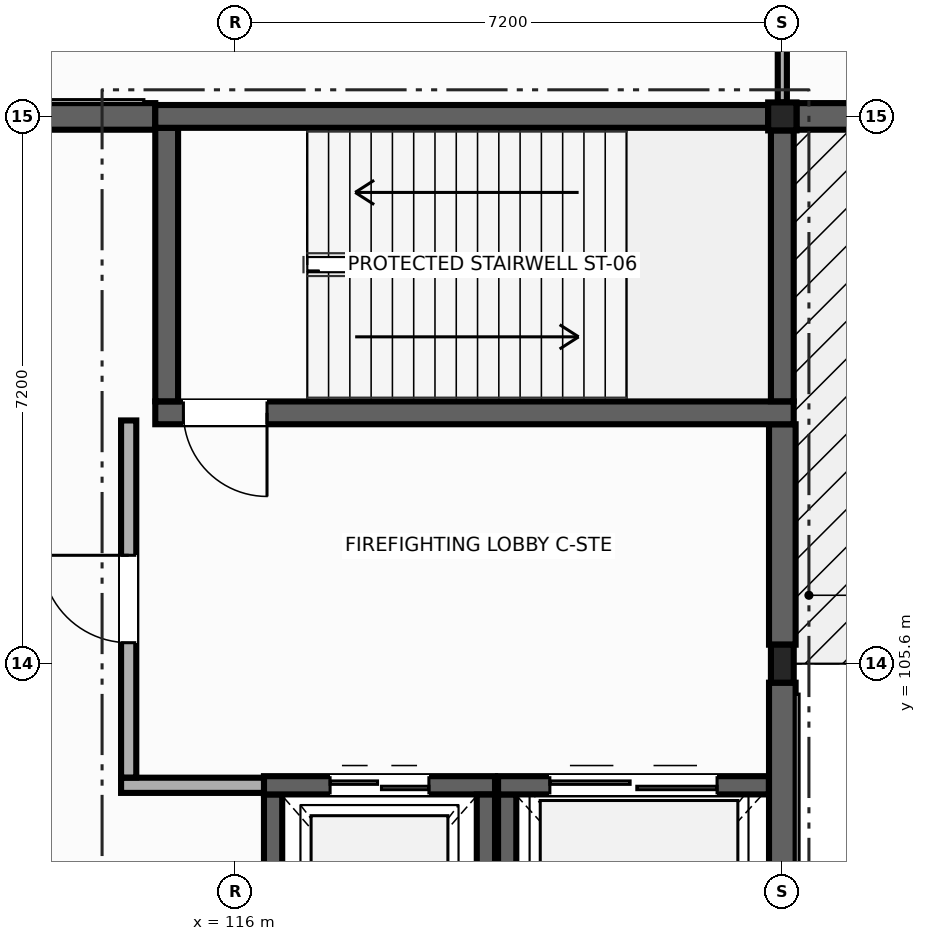
"""IFC4 building model, lengths in metres.
Left out: names, types, materials, properties, quantities, classifications, styles, units other than length and angle.
Written with IfcOpenShell. Run it as: python <this file> out.ifc"""

import sys

from ifc_helpers import new_model, si_unit, direction, frame, frame_2d, origin, origin_2d, place, context, subcontext, project, spatial, rectangle, i_section, extrude, element, fill, save


model = new_model("IFC4")
c1 = context("Model", 3, precision=1e-05, world=origin(), true_north=direction((0.0, 1.0)))
c2 = subcontext(c1, "Body", "Model", "MODEL_VIEW")
j1 = project(units=[si_unit("LENGTHUNIT", "METRE"), si_unit("PLANEANGLEUNIT", "RADIAN")], contexts=[c1])
p1 = place(None, origin())
s1 = spatial("IfcSite", under=j1, at=p1, CompositionType="ELEMENT")
p2 = place(p1, origin())
s2 = spatial("IfcBuilding", under=s1, at=p2, CompositionType="ELEMENT")
p3 = place(p2, origin())
s3 = spatial("IfcBuildingStorey", under=s2, at=p3, CompositionType="ELEMENT", Elevation=0.0)
p4 = place(p3, frame((123.2, 105.6, 0.0), z_axis=(0.0, 0.0, 1.0), x_axis=(1.0, 0.0, 0.0)))
e1 = element("IfcColumn", 1, at=p4, inside=s3, PredefinedType="COLUMN", context=c2, shape_type="SweptSolid", body=[
    extrude(i_section(OverallWidth=0.3, OverallDepth=0.5, WebThickness=0.014, FlangeThickness=0.028, at=origin_2d()), origin(), (0.0, 0.0, 1.0), 5.4),
])
p5 = place(p3, frame((123.2, 112.8, 0.0), z_axis=(0.0, 0.0, 1.0), x_axis=(1.0, 0.0, 0.0)))
e2 = element("IfcColumn", 2, at=p5, inside=s3, PredefinedType="COLUMN", context=c2, shape_type="SweptSolid", body=[
    extrude(i_section(OverallWidth=0.373, OverallDepth=0.368, WebThickness=0.014, FlangeThickness=0.024, at=origin_2d()), origin(), (0.0, 0.0, 1.0), 5.4),
])
p6 = place(p3, frame((109.05, 112.8, 0.0), z_axis=(0.0, 0.0, 1.0), x_axis=(1.0, 0.0, 0.0)))
e3 = element("IfcWall", 3, at=p6, inside=s3, PredefinedType="SOLIDWALL", context=c2, shape_type="SweptSolid", body=[
    extrude(rectangle(XDim=5.9, YDim=0.35, at=frame_2d((2.95, 0.0))), origin(), (0.0, 0.0, 1.0), 5.12),
])
p7 = place(p6, frame((1.65, 0.0, 0.0)))
e4 = element("IfcOpeningElement", 4, at=p7, cuts=e3, PredefinedType="OPENING", context=c2, shape_type="SweptSolid", body=[
    extrude(rectangle(XDim=2.6, YDim=2.8, at=frame_2d((1.3, 1.4))), frame((0.0, 0.185, 0.0), z_axis=(0.0, -1.0, 0.0), x_axis=(1.0, 0.0, 0.0)), (0.0, 0.0, 1.0), 0.37),
])
p8 = place(p3, frame((123.2, 108.75, 0.0), z_axis=(0.0, 0.0, 1.0), x_axis=(0.0, -1.0, 0.0)))
e5 = element("IfcWall", 5, at=p8, inside=s3, PredefinedType="SOLIDWALL", context=c2, shape_type="SweptSolid", body=[
    extrude(rectangle(XDim=2.9, YDim=0.35, at=frame_2d((1.45, 0.0))), origin(), (0.0, 0.0, 1.0), 5.15),
])
p9 = place(p3, frame((123.2, 105.35, 0.0), z_axis=(0.0, 0.0, 1.0), x_axis=(0.0, -1.0, 0.0)))
e6 = element("IfcWall", 6, at=p9, inside=s3, PredefinedType="SOLIDWALL", context=c2, shape_type="SweptSolid", body=[
    extrude(rectangle(XDim=6.8, YDim=0.35, at=frame_2d((3.4, 0.0))), origin(), (0.0, 0.0, 1.0), 5.15),
])
p10 = place(p3, frame((130.05, 112.8, 0.0), z_axis=(0.0, 0.0, 1.0), x_axis=(-1.0, 0.0, 0.0)))
e7 = element("IfcWall", 7, at=p10, inside=s3, PredefinedType="SOLIDWALL", context=c2, shape_type="SweptSolid", body=[
    extrude(rectangle(XDim=6.664, YDim=0.35, at=frame_2d((3.332, 0.0))), origin(), (0.0, 0.0, 1.0), 5.12),
])
p11 = place(p10, frame((2.132, 0.0, 0.0)))
e8 = element("IfcOpeningElement", 8, at=p11, cuts=e7, PredefinedType="OPENING", context=c2, shape_type="SweptSolid", body=[
    extrude(rectangle(XDim=2.4, YDim=2.7, at=frame_2d((1.2, 1.35))), frame((0.0, 0.185, 0.0), z_axis=(0.0, -1.0, 0.0), x_axis=(1.0, 0.0, 0.0)), (0.0, 0.0, 1.0), 0.37),
])
p12 = place(p3, frame((123.35, 108.9, 0.0), z_axis=(0.0, 0.0, 1.0), x_axis=(-1.0, 0.0, 0.0)))
e9 = element("IfcWall", 9, at=p12, inside=s3, PredefinedType="SHEAR", context=c2, shape_type="SweptSolid", body=[
    extrude(rectangle(XDim=8.4, YDim=0.3, at=frame_2d((4.2, 0.0))), origin(), (0.0, 0.0, 1.0), 5.15),
])
p13 = place(p12, frame((6.93, 0.0, 0.0)))
e10 = element("IfcOpeningElement", 10, at=p13, cuts=e9, PredefinedType="OPENING", context=c2, shape_type="SweptSolid", body=[
    extrude(rectangle(XDim=1.1, YDim=2.15, at=frame_2d((0.55, 1.075))), frame((0.0, 0.16, 0.0), z_axis=(0.0, -1.0, 0.0), x_axis=(1.0, 0.0, 0.0)), (0.0, 0.0, 1.0), 0.32),
])
p14 = place(p3, frame((115.1, 109.052, 0.0), z_axis=(0.0, 0.0, 1.0), x_axis=(0.0, 1.0, 0.0)))
e11 = element("IfcWall", 11, at=p14, inside=s3, PredefinedType="SHEAR", context=c2, shape_type="SweptSolid", body=[
    extrude(rectangle(XDim=3.598, YDim=0.3, at=frame_2d((1.799, 0.0))), origin(), (0.0, 0.0, 1.0), 5.15),
])
p15 = place(p3, frame((114.95, 112.8, 0.0), z_axis=(0.0, 0.0, 1.0), x_axis=(1.0, 0.0, 0.0)))
e12 = element("IfcWall", 12, at=p15, inside=s3, PredefinedType="SHEAR", context=c2, shape_type="SweptSolid", body=[
    extrude(rectangle(XDim=8.064, YDim=0.3, at=frame_2d((4.032, 0.0))), origin(), (0.0, 0.0, 1.0), 5.12),
])
p16 = place(p3, frame((123.2, 112.616, 0.0), z_axis=(0.0, 0.0, 1.0), x_axis=(0.0, -1.0, 0.0)))
e13 = element("IfcWall", 13, at=p16, inside=s3, PredefinedType="SHEAR", context=c2, shape_type="SweptSolid", body=[
    extrude(rectangle(XDim=3.564, YDim=0.3, at=frame_2d((1.782, 0.0))), origin(), (0.0, 0.0, 1.0), 5.15),
])
p17 = place(p3, frame((116.5, 100.922, 0.0), z_axis=(0.0, 0.0, 1.0), x_axis=(0.0, 1.0, 0.0)))
e14 = element("IfcWall", 14, at=p17, inside=s3, PredefinedType="SHEAR", context=c2, shape_type="SweptSolid", body=[
    extrude(rectangle(XDim=2.958, YDim=0.24, at=frame_2d((1.479, 0.0))), origin(), (0.0, 0.0, 1.0), 5.15),
])
p18 = place(p3, frame((116.38, 104.0, 0.0), z_axis=(0.0, 0.0, 1.0), x_axis=(1.0, 0.0, 0.0)))
e15 = element("IfcWall", 15, at=p18, inside=s3, PredefinedType="SHEAR", context=c2, shape_type="SweptSolid", body=[
    extrude(rectangle(XDim=3.04, YDim=0.24, at=frame_2d((1.52, 0.0))), origin(), (0.0, 0.0, 1.0), 5.15),
])
p19 = place(p18, frame((0.87, 0.0, 0.0)))
e16 = element("IfcOpeningElement", 16, at=p19, cuts=e15, PredefinedType="OPENING", context=c2, shape_type="SweptSolid", body=[
    extrude(rectangle(XDim=1.3, YDim=2.15, at=frame_2d((0.65, 1.075))), frame((0.0, 0.13, 0.0), z_axis=(0.0, -1.0, 0.0), x_axis=(1.0, 0.0, 0.0)), (0.0, 0.0, 1.0), 0.26),
])
p20 = place(p3, frame((119.3, 103.878, 0.0), z_axis=(0.0, 0.0, 1.0), x_axis=(0.0, -1.0, 0.0)))
e17 = element("IfcWall", 17, at=p20, inside=s3, PredefinedType="SHEAR", context=c2, shape_type="SweptSolid", body=[
    extrude(rectangle(XDim=2.956, YDim=0.24, at=frame_2d((1.478, 0.0))), origin(), (0.0, 0.0, 1.0), 5.15),
])
p21 = place(p3, frame((119.58, 100.322, 0.0), z_axis=(0.0, 0.0, 1.0), x_axis=(0.0, 1.0, 0.0)))
e18 = element("IfcWall", 18, at=p21, inside=s3, PredefinedType="SHEAR", context=c2, shape_type="SweptSolid", body=[
    extrude(rectangle(XDim=3.558, YDim=0.24, at=frame_2d((1.779, 0.0))), origin(), (0.0, 0.0, 1.0), 5.15),
])
p22 = place(p3, frame((119.46, 104.0, 0.0), z_axis=(0.0, 0.0, 1.0), x_axis=(1.0, 0.0, 0.0)))
e19 = element("IfcWall", 19, at=p22, inside=s3, PredefinedType="SHEAR", context=c2, shape_type="SweptSolid", body=[
    extrude(rectangle(XDim=3.563, YDim=0.24, at=frame_2d((1.781, 0.0))), origin(), (0.0, 0.0, 1.0), 5.15),
])
p23 = place(p22, frame((0.681, 0.0, 0.0)))
e20 = element("IfcOpeningElement", 20, at=p23, cuts=e19, PredefinedType="OPENING", context=c2, shape_type="SweptSolid", body=[
    extrude(rectangle(XDim=2.2, YDim=2.5, at=frame_2d((1.1, 1.25))), frame((0.0, 0.13, 0.0), z_axis=(0.0, -1.0, 0.0), x_axis=(1.0, 0.0, 0.0)), (0.0, 0.0, 1.0), 0.26),
])
p24 = place(p3, frame((116.38, 104.0, 0.0), z_axis=(0.0, 0.0, 1.0), x_axis=(-1.0, 0.0, 0.0)))
e21 = element("IfcWall", 21, at=p24, inside=s3, PredefinedType="PARTITIONING", context=c2, shape_type="SweptSolid", body=[
    extrude(rectangle(XDim=1.88, YDim=0.2, at=frame_2d((0.94, 0.0))), origin(), (0.0, 0.0, 1.0), 5.15),
])
p25 = place(p3, frame((114.6, 104.102, 0.0), z_axis=(0.0, 0.0, 1.0), x_axis=(0.0, 1.0, 0.0)))
e22 = element("IfcWall", 22, at=p25, inside=s3, PredefinedType="PARTITIONING", context=c2, shape_type="SweptSolid", body=[
    extrude(rectangle(XDim=4.698, YDim=0.2, at=frame_2d((2.349, 0.0))), origin(), (0.0, 0.0, 1.0), 5.15),
])
p26 = place(p25, frame((1.774, 0.0, 0.0)))
e23 = element("IfcOpeningElement", 23, at=p26, cuts=e22, PredefinedType="OPENING", context=c2, shape_type="SweptSolid", body=[
    extrude(rectangle(XDim=1.15, YDim=2.15, at=frame_2d((0.575, 1.075))), frame((0.0, 0.11, 0.0), z_axis=(0.0, -1.0, 0.0), x_axis=(1.0, 0.0, 0.0)), (0.0, 0.0, 1.0), 0.22),
])
p27 = place(p3, frame((123.2, 119.65, 0.0), z_axis=(0.0, 0.0, 1.0), x_axis=(0.0, -1.0, 0.0)))
e24 = element("IfcWall", 24, at=p27, inside=s3, PredefinedType="PARTITIONING", context=c2, shape_type="SweptSolid", body=[
    extrude(rectangle(XDim=6.666, YDim=0.12, at=frame_2d((3.333, 0.0))), origin(), (0.0, 0.0, 1.0), 4.315),
])
p28 = place(p27, frame((2.433, 0.0, 1.1)))
e25 = element("IfcOpeningElement", 25, at=p28, cuts=e24, PredefinedType="OPENING", context=c2, shape_type="SweptSolid", body=[
    extrude(rectangle(XDim=1.8, YDim=1.3, at=frame_2d((0.9, 0.65))), frame((0.0, 0.07, 0.0), z_axis=(0.0, -1.0, 0.0), x_axis=(1.0, 0.0, 0.0)), (0.0, 0.0, 1.0), 0.14),
])
p29 = place(p13, origin())
e26 = element("IfcDoor", 26, at=p29, inside=s3, OperationType="SINGLE_SWING_LEFT", PredefinedType="DOOR", context=c2, shape_type="SweptSolid", body=[
    extrude(rectangle(XDim=1.1, YDim=2.15, at=frame_2d((0.55, 1.075))), frame((0.0, 0.025, 0.0), z_axis=(0.0, -1.0, 0.0), x_axis=(1.0, 0.0, 0.0)), (0.0, 0.0, 1.0), 0.05),
])
fill(e10, e26)
p30 = place(p19, origin())
e27 = element("IfcDoor", 27, at=p30, inside=s3, OperationType="DOUBLE_DOOR_SLIDING", PredefinedType="DOOR", context=c2, shape_type="SweptSolid", body=[
    extrude(rectangle(XDim=1.3, YDim=2.15, at=frame_2d((0.65, 1.075))), frame((0.0, 0.025, 0.0), z_axis=(0.0, -1.0, 0.0), x_axis=(1.0, 0.0, 0.0)), (0.0, 0.0, 1.0), 0.05),
])
fill(e16, e27)
p31 = place(p23, origin())
e28 = element("IfcDoor", 28, at=p31, inside=s3, OperationType="DOUBLE_DOOR_SLIDING", PredefinedType="DOOR", context=c2, shape_type="SweptSolid", body=[
    extrude(rectangle(XDim=2.2, YDim=2.5, at=frame_2d((1.1, 1.25))), frame((0.0, 0.025, 0.0), z_axis=(0.0, -1.0, 0.0), x_axis=(1.0, 0.0, 0.0)), (0.0, 0.0, 1.0), 0.05),
])
fill(e20, e28)
p32 = place(p26, origin())
e29 = element("IfcDoor", 29, at=p32, inside=s3, OperationType="SINGLE_SWING_RIGHT", PredefinedType="DOOR", context=c2, shape_type="SweptSolid", body=[
    extrude(rectangle(XDim=1.15, YDim=2.15, at=frame_2d((0.575, 1.075))), frame((0.0, 0.025, 0.0), z_axis=(0.0, -1.0, 0.0), x_axis=(1.0, 0.0, 0.0)), (0.0, 0.0, 1.0), 0.05),
])
fill(e23, e29)
save(model, sys.argv[1])
